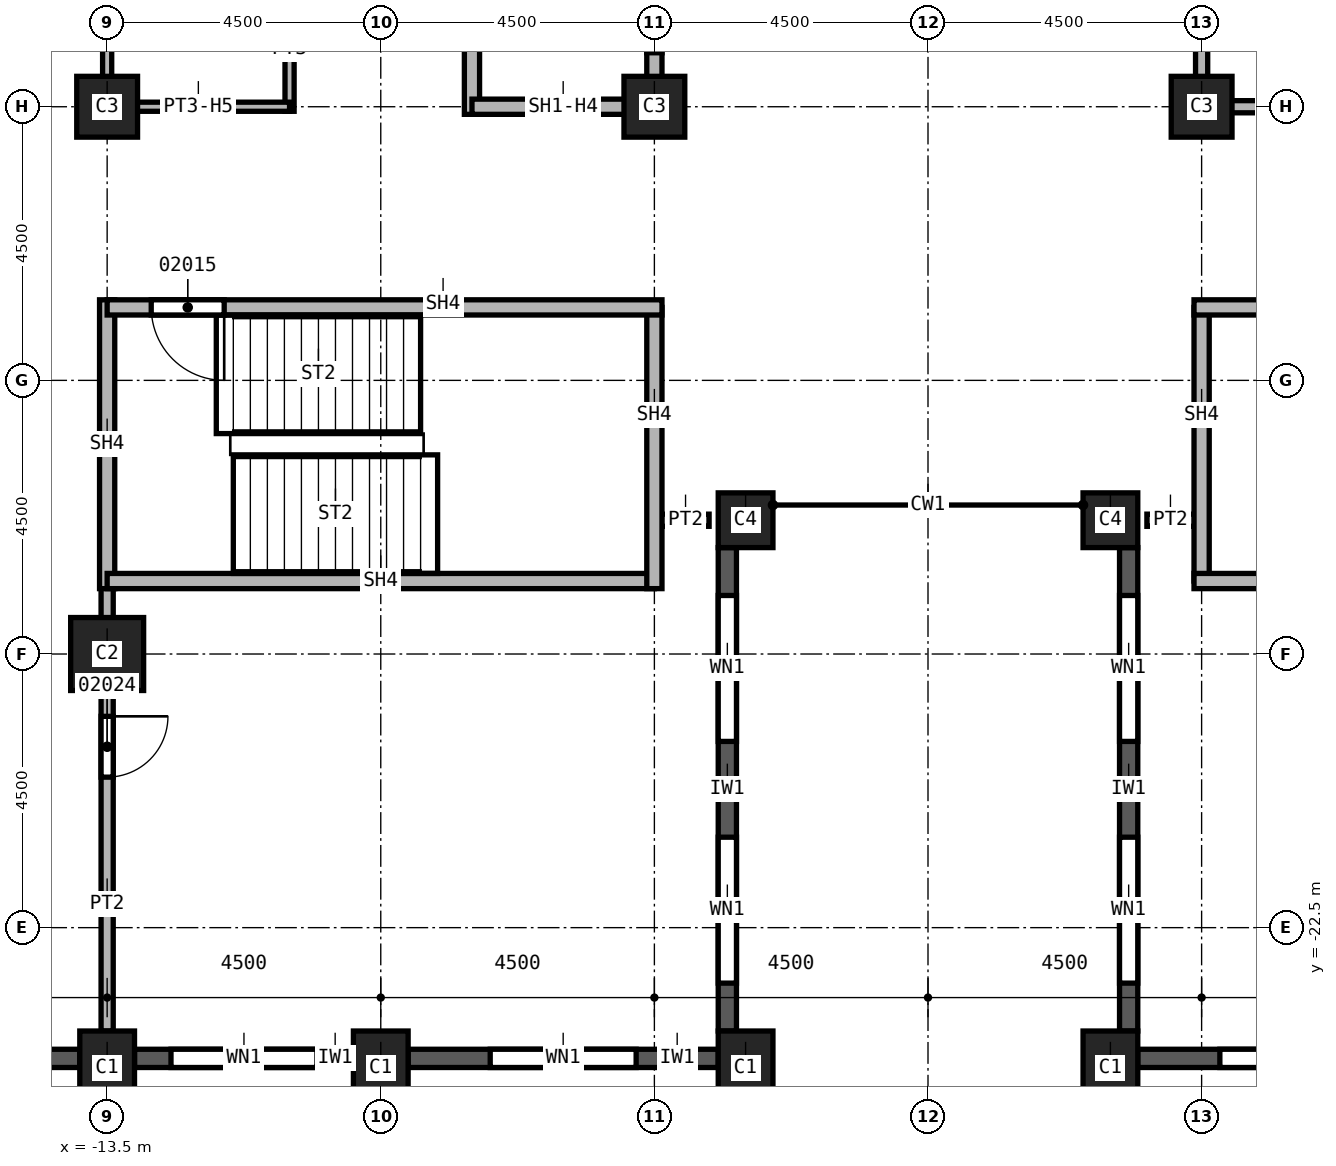
"""IFC4 building model, lengths in metres.
Left out: names, types, materials, properties, quantities, classifications, styles, units other than length and angle.
Written with IfcOpenShell. Run it as: python <this file> out.ifc"""

import sys

from ifc_helpers import new_model, si_unit, direction, frame, frame_2d, origin, origin_2d, place, context, subcontext, project, spatial, rectangle, extrude, element, fill, save


model = new_model("IFC4")
c1 = context("Model", 3, precision=1e-05, world=origin(), true_north=direction((0.0, 1.0)))
c2 = subcontext(c1, "Body", "Model", "MODEL_VIEW")
j1 = project(units=[si_unit("LENGTHUNIT", "METRE"), si_unit("PLANEANGLEUNIT", "RADIAN")], contexts=[c1])
p1 = place(None, origin())
s1 = spatial("IfcSite", under=j1, at=p1, CompositionType="ELEMENT")
p2 = place(p1, origin())
s2 = spatial("IfcBuilding", under=s1, at=p2, CompositionType="ELEMENT")
p3 = place(p2, frame((0.0, 0.0, 80.0)))
s3 = spatial("IfcBuildingStorey", under=s2, at=p3, CompositionType="ELEMENT", Elevation=80.0)
p4 = place(p3, frame((-13.5, -18.0, 0.0), z_axis=(0.0, 0.0, 1.0), x_axis=(1.0, 0.0, 0.0)))
e1 = element("IfcColumn", 1, at=p4, inside=s3, PredefinedType="COLUMN", context=c2, shape_type="SweptSolid", body=[
    extrude(rectangle(XDim=1.2, YDim=1.2, at=origin_2d()), origin(), (0.0, 0.0, 1.0), 3.7),
])
for number, where, z_axis, x_axis in (
    (2, (4.5, -9.0, 0.0), (0.0, 0.0, 1.0), (1.0, 0.0, 0.0)),
    (3, (-4.5, -9.0, 0.0), (0.0, 0.0, 1.0), (1.0, 0.0, 0.0)),
    (4, (-13.5, -9.0, 0.0), (0.0, 0.0, 1.0), (1.0, 0.0, 0.0)),
):
    element("IfcColumn", number, at=place(p3, frame(where, z_axis=z_axis, x_axis=x_axis)), inside=s3, PredefinedType="COLUMN", context=c2, shape_type="SweptSolid", body=[
        extrude(rectangle(XDim=1.0, YDim=1.0, at=origin_2d()), origin(), (0.0, 0.0, 1.0), 3.7),
    ])
for number, where, z_axis, x_axis in (
    (5, (3.0, -24.8, 0.0), (0.0, 0.0, 1.0), (1.0, 0.0, 0.0)),
    (6, (-3.0, -24.8, 0.0), (0.0, 0.0, 1.0), (1.0, 0.0, 0.0)),
    (7, (-9.0, -24.8, 0.0), (0.0, 0.0, 1.0), (1.0, 0.0, 0.0)),
    (8, (-13.5, -24.8, 0.0), (0.0, 0.0, 1.0), (1.0, 0.0, 0.0)),
):
    element("IfcColumn", number, at=place(p3, frame(where, z_axis=z_axis, x_axis=x_axis)), inside=s3, PredefinedType="COLUMN", context=c2, shape_type="SweptSolid", body=[
        extrude(rectangle(XDim=0.9, YDim=1.2, at=origin_2d()), origin(), (0.0, 0.0, 1.0), 3.7),
    ])
for number, where, z_axis, x_axis in (
    (9, (3.0, -15.8, 0.0), (0.0, 0.0, 1.0), (1.0, 0.0, 0.0)),
    (10, (-3.0, -15.8, 0.0), (0.0, 0.0, 1.0), (1.0, 0.0, 0.0)),
):
    element("IfcColumn", number, at=place(p3, frame(where, z_axis=z_axis, x_axis=x_axis)), inside=s3, PredefinedType="COLUMN", context=c2, shape_type="SweptSolid", body=[
        extrude(rectangle(XDim=0.9, YDim=0.9, at=origin_2d()), origin(), (0.0, 0.0, 1.0), 3.7),
    ])
p5 = place(p3, frame((-17.55, -24.65, 0.0), z_axis=(0.0, 0.0, 1.0), x_axis=(1.0, 0.0, 0.0)))
e11 = element("IfcWall", 11, at=p5, inside=s3, PredefinedType="SOLIDWALL", context=c2, shape_type="SweptSolid", body=[
    extrude(rectangle(XDim=3.6, YDim=0.3, at=frame_2d((1.8, 0.0))), origin(), (0.0, 0.0, 1.0), 3.1),
])
p6 = place(p5, frame((0.775, 0.0, 0.8)))
e12 = element("IfcOpeningElement", 12, at=p6, cuts=e11, PredefinedType="OPENING", context=c2, shape_type="SweptSolid", body=[
    extrude(rectangle(XDim=1.0, YDim=1.95, at=frame_2d((0.5, 0.975))), frame((0.0, 0.15, 0.0), z_axis=(0.0, -1.0, 0.0), x_axis=(1.0, 0.0, 0.0)), (0.0, 0.0, 1.0), 0.3),
])
p7 = place(p5, frame((2.375, 0.0, 0.8)))
e13 = element("IfcOpeningElement", 13, at=p7, cuts=e11, PredefinedType="OPENING", context=c2, shape_type="SweptSolid", body=[
    extrude(rectangle(XDim=0.6, YDim=1.95, at=frame_2d((0.3, 0.975))), frame((0.0, 0.15, 0.0), z_axis=(0.0, -1.0, 0.0), x_axis=(1.0, 0.0, 0.0)), (0.0, 0.0, 1.0), 0.3),
])
p8 = place(p3, frame((-13.05, -24.65, 0.0), z_axis=(0.0, 0.0, 1.0), x_axis=(1.0, 0.0, 0.0)))
e14 = element("IfcWall", 14, at=p8, inside=s3, PredefinedType="SOLIDWALL", context=c2, shape_type="SweptSolid", body=[
    extrude(rectangle(XDim=3.6, YDim=0.3, at=frame_2d((1.8, 0.0))), origin(), (0.0, 0.0, 1.0), 3.1),
])
p9 = place(p8, frame((0.6, 0.0, 0.8)))
e15 = element("IfcOpeningElement", 15, at=p9, cuts=e14, PredefinedType="OPENING", context=c2, shape_type="SweptSolid", body=[
    extrude(rectangle(XDim=2.4, YDim=1.95, at=frame_2d((1.2, 0.975))), frame((0.0, 0.15, 0.0), z_axis=(0.0, -1.0, 0.0), x_axis=(1.0, 0.0, 0.0)), (0.0, 0.0, 1.0), 0.3),
])
p10 = place(p3, frame((-8.55, -24.65, 0.0), z_axis=(0.0, 0.0, 1.0), x_axis=(1.0, 0.0, 0.0)))
e16 = element("IfcWall", 16, at=p10, inside=s3, PredefinedType="SOLIDWALL", context=c2, shape_type="SweptSolid", body=[
    extrude(rectangle(XDim=5.1, YDim=0.3, at=frame_2d((2.55, 0.0))), origin(), (0.0, 0.0, 1.0), 3.1),
])
p11 = place(p10, frame((1.35, 0.0, 0.8)))
e17 = element("IfcOpeningElement", 17, at=p11, cuts=e16, PredefinedType="OPENING", context=c2, shape_type="SweptSolid", body=[
    extrude(rectangle(XDim=2.4, YDim=1.95, at=frame_2d((1.2, 0.975))), frame((0.0, 0.15, 0.0), z_axis=(0.0, -1.0, 0.0), x_axis=(1.0, 0.0, 0.0)), (0.0, 0.0, 1.0), 0.3),
])
p12 = place(p3, frame((-3.3, -24.2, 0.0), z_axis=(0.0, 0.0, 1.0), x_axis=(0.0, 1.0, 0.0)))
e18 = element("IfcWall", 18, at=p12, inside=s3, PredefinedType="SOLIDWALL", context=c2, shape_type="SweptSolid", body=[
    extrude(rectangle(XDim=7.95, YDim=0.3, at=frame_2d((3.975, 0.0))), origin(), (0.0, 0.0, 1.0), 3.1),
])
p13 = place(p12, frame((0.788, 0.0, 0.8)))
e19 = element("IfcOpeningElement", 19, at=p13, cuts=e18, PredefinedType="OPENING", context=c2, shape_type="SweptSolid", body=[
    extrude(rectangle(XDim=2.4, YDim=1.95, at=frame_2d((1.2, 0.975))), frame((0.0, 0.15, 0.0), z_axis=(0.0, -1.0, 0.0), x_axis=(1.0, 0.0, 0.0)), (0.0, 0.0, 1.0), 0.3),
])
p14 = place(p12, frame((4.762, 0.0, 0.8)))
e20 = element("IfcOpeningElement", 20, at=p14, cuts=e18, PredefinedType="OPENING", context=c2, shape_type="SweptSolid", body=[
    extrude(rectangle(XDim=2.4, YDim=1.95, at=frame_2d((1.2, 0.975))), frame((0.0, 0.15, 0.0), z_axis=(0.0, -1.0, 0.0), x_axis=(1.0, 0.0, 0.0)), (0.0, 0.0, 1.0), 0.3),
])
p15 = place(p3, frame((3.3, -16.25, 0.0), z_axis=(0.0, 0.0, 1.0), x_axis=(0.0, -1.0, 0.0)))
e21 = element("IfcWall", 21, at=p15, inside=s3, PredefinedType="SOLIDWALL", context=c2, shape_type="SweptSolid", body=[
    extrude(rectangle(XDim=7.95, YDim=0.3, at=frame_2d((3.975, 0.0))), origin(), (0.0, 0.0, 1.0), 3.1),
])
p16 = place(p15, frame((0.788, 0.0, 0.8)))
e22 = element("IfcOpeningElement", 22, at=p16, cuts=e21, PredefinedType="OPENING", context=c2, shape_type="SweptSolid", body=[
    extrude(rectangle(XDim=2.4, YDim=1.95, at=frame_2d((1.2, 0.975))), frame((0.0, 0.15, 0.0), z_axis=(0.0, -1.0, 0.0), x_axis=(1.0, 0.0, 0.0)), (0.0, 0.0, 1.0), 0.3),
])
p17 = place(p15, frame((4.762, 0.0, 0.8)))
e23 = element("IfcOpeningElement", 23, at=p17, cuts=e21, PredefinedType="OPENING", context=c2, shape_type="SweptSolid", body=[
    extrude(rectangle(XDim=2.4, YDim=1.95, at=frame_2d((1.2, 0.975))), frame((0.0, 0.15, 0.0), z_axis=(0.0, -1.0, 0.0), x_axis=(1.0, 0.0, 0.0)), (0.0, 0.0, 1.0), 0.3),
])
p18 = place(p3, frame((3.45, -24.65, 0.0), z_axis=(0.0, 0.0, 1.0), x_axis=(1.0, 0.0, 0.0)))
e24 = element("IfcWall", 24, at=p18, inside=s3, PredefinedType="SOLIDWALL", context=c2, shape_type="SweptSolid", body=[
    extrude(rectangle(XDim=5.1, YDim=0.3, at=frame_2d((2.55, 0.0))), origin(), (0.0, 0.0, 1.0), 3.1),
])
p19 = place(p18, frame((1.35, 0.0, 0.8)))
e25 = element("IfcOpeningElement", 25, at=p19, cuts=e24, PredefinedType="OPENING", context=c2, shape_type="SweptSolid", body=[
    extrude(rectangle(XDim=2.4, YDim=1.95, at=frame_2d((1.2, 0.975))), frame((0.0, 0.15, 0.0), z_axis=(0.0, -1.0, 0.0), x_axis=(1.0, 0.0, 0.0)), (0.0, 0.0, 1.0), 0.3),
])
p20 = place(p3, frame((-13.5, -16.675, 0.0), z_axis=(0.0, 0.0, 1.0), x_axis=(0.0, -1.0, 0.0)))
e26 = element("IfcWall", 26, at=p20, inside=s3, PredefinedType="PARTITIONING", context=c2, shape_type="SweptSolid", body=[
    extrude(rectangle(XDim=7.525, YDim=0.2, at=frame_2d((3.762, 0.0))), origin(), (0.0, 0.0, 1.0), 3.7),
])
p21 = place(p20, frame((2.35, 0.0, 0.0)))
e27 = element("IfcOpeningElement", 27, at=p21, cuts=e26, PredefinedType="OPENING", context=c2, shape_type="SweptSolid", body=[
    extrude(rectangle(XDim=1.0, YDim=2.1, at=frame_2d((0.5, 1.05))), frame((0.0, 0.1, 0.0), z_axis=(0.0, -1.0, 0.0), x_axis=(1.0, 0.0, 0.0)), (0.0, 0.0, 1.0), 0.2),
])
for number, where, z_axis, x_axis in (
    (28, (-3.6, -15.8, 0.0), (0.0, 0.0, 1.0), (-1.0, 0.0, 0.0)),
    (29, (4.5, -15.8, 0.0), (0.0, 0.0, 1.0), (-1.0, 0.0, 0.0)),
):
    element("IfcWall", number, at=place(p3, frame(where, z_axis=z_axis, x_axis=x_axis)), inside=s3, PredefinedType="PARTITIONING", context=c2, shape_type="SweptSolid", body=[
        extrude(rectangle(XDim=0.9, YDim=0.2, at=frame_2d((0.45, 0.0))), origin(), (0.0, 0.0, 1.0), 3.7),
    ])
p22 = place(p3, frame((4.5, -9.1, 0.0), z_axis=(0.0, 0.0, 1.0), x_axis=(0.0, 1.0, 0.0)))
e30 = element("IfcWall", 30, at=p22, inside=s3, PredefinedType="SOLIDWALL", context=c2, shape_type="SweptSolid", body=[
    extrude(rectangle(XDim=9.1, YDim=0.2, at=frame_2d((4.55, 0.0))), origin(), (0.0, 0.0, 1.0), 2.938),
])
p23 = place(p22, frame((2.2, 0.0, 0.0)))
e31 = element("IfcOpeningElement", 31, at=p23, cuts=e30, PredefinedType="OPENING", context=c2, shape_type="SweptSolid", body=[
    extrude(rectangle(XDim=1.1, YDim=2.1, at=frame_2d((0.55, 1.05))), frame((0.0, 0.1, 0.0), z_axis=(0.0, -1.0, 0.0), x_axis=(1.0, 0.0, 0.0)), (0.0, 0.0, 1.0), 0.2),
])
p24 = place(p3, frame((7.5, -9.0, 0.0), z_axis=(0.0, 0.0, 1.0), x_axis=(-1.0, 0.0, 0.0)))
e32 = element("IfcWall", 32, at=p24, inside=s3, PredefinedType="SOLIDWALL", context=c2, shape_type="SweptSolid", body=[
    extrude(rectangle(XDim=3.0, YDim=0.2, at=frame_2d((1.5, 0.0))), origin(), (0.0, 0.0, 1.0), 2.938),
])
p25 = place(p3, frame((-7.5, -9.125, 0.0), z_axis=(0.0, 0.0, 1.0), x_axis=(0.0, 1.0, 0.0)))
e33 = element("IfcWall", 33, at=p25, inside=s3, PredefinedType="SOLIDWALL", context=c2, shape_type="SweptSolid", body=[
    extrude(rectangle(XDim=12.25, YDim=0.25, at=frame_2d((6.125, 0.0))), origin(), (0.0, 0.0, 1.0), 3.7),
])
p26 = place(p3, frame((-4.5, -9.0, 0.0), z_axis=(0.0, 0.0, 1.0), x_axis=(-1.0, 0.0, 0.0)))
e34 = element("IfcWall", 34, at=p26, inside=s3, PredefinedType="SOLIDWALL", context=c2, shape_type="SweptSolid", body=[
    extrude(rectangle(XDim=3.0, YDim=0.25, at=frame_2d((1.5, 0.0))), origin(), (0.0, 0.0, 1.0), 2.938),
])
p27 = place(p3, frame((-4.5, 0.0, 0.0), z_axis=(0.0, 0.0, 1.0), x_axis=(0.0, -1.0, 0.0)))
e35 = element("IfcWall", 35, at=p27, inside=s3, PredefinedType="SOLIDWALL", context=c2, shape_type="SweptSolid", body=[
    extrude(rectangle(XDim=9.125, YDim=0.25, at=frame_2d((4.562, 0.0))), origin(), (0.0, 0.0, 1.0), 2.938),
])
p28 = place(p27, frame((7.012, 0.0, 0.0)))
e36 = element("IfcOpeningElement", 36, at=p28, cuts=e35, PredefinedType="OPENING", context=c2, shape_type="SweptSolid", body=[
    extrude(rectangle(XDim=1.1, YDim=2.1, at=frame_2d((0.55, 1.05))), frame((0.0, 0.125, 0.0), z_axis=(0.0, -1.0, 0.0), x_axis=(1.0, 0.0, 0.0)), (0.0, 0.0, 1.0), 0.25),
])
p29 = place(p27, frame((3.95, 0.0, 0.0)))
e37 = element("IfcOpeningElement", 37, at=p29, cuts=e35, PredefinedType="OPENING", context=c2, shape_type="SweptSolid", body=[
    extrude(rectangle(XDim=1.1, YDim=2.1, at=frame_2d((0.55, 1.05))), frame((0.0, 0.125, 0.0), z_axis=(0.0, -1.0, 0.0), x_axis=(1.0, 0.0, 0.0)), (0.0, 0.0, 1.0), 0.25),
])
p30 = place(p27, frame((0.95, 0.0, 0.0)))
e38 = element("IfcOpeningElement", 38, at=p30, cuts=e35, PredefinedType="OPENING", context=c2, shape_type="SweptSolid", body=[
    extrude(rectangle(XDim=1.1, YDim=2.1, at=frame_2d((0.55, 1.05))), frame((0.0, 0.125, 0.0), z_axis=(0.0, -1.0, 0.0), x_axis=(1.0, 0.0, 0.0)), (0.0, 0.0, 1.0), 0.25),
])
p31 = place(p3, frame((-13.5, -12.175, 0.0), z_axis=(0.0, 0.0, 1.0), x_axis=(0.0, -1.0, 0.0)))
e39 = element("IfcWall", 39, at=p31, inside=s3, PredefinedType="SOLIDWALL", context=c2, shape_type="SweptSolid", body=[
    extrude(rectangle(XDim=4.75, YDim=0.25, at=frame_2d((2.375, 0.0))), origin(), (0.0, 0.0, 1.0), 3.7),
])
p32 = place(p3, frame((-4.5, -16.8, 0.0), z_axis=(0.0, 0.0, 1.0), x_axis=(-1.0, 0.0, 0.0)))
e40 = element("IfcWall", 40, at=p32, inside=s3, PredefinedType="SOLIDWALL", context=c2, shape_type="SweptSolid", body=[
    extrude(rectangle(XDim=9.0, YDim=0.25, at=frame_2d((4.5, 0.0))), origin(), (0.0, 0.0, 1.0), 3.7),
])
p33 = place(p3, frame((-4.5, -12.3, 0.0), z_axis=(0.0, 0.0, 1.0), x_axis=(0.0, -1.0, 0.0)))
e41 = element("IfcWall", 41, at=p33, inside=s3, PredefinedType="SOLIDWALL", context=c2, shape_type="SweptSolid", body=[
    extrude(rectangle(XDim=4.625, YDim=0.25, at=frame_2d((2.312, 0.0))), origin(), (0.0, 0.0, 1.0), 3.7),
])
p34 = place(p3, frame((-4.375, -12.3, 0.0), z_axis=(0.0, 0.0, 1.0), x_axis=(-1.0, 0.0, 0.0)))
e42 = element("IfcWall", 42, at=p34, inside=s3, PredefinedType="SOLIDWALL", context=c2, shape_type="SweptSolid", body=[
    extrude(rectangle(XDim=9.125, YDim=0.25, at=frame_2d((4.562, 0.0))), origin(), (0.0, 0.0, 1.0), 3.7),
])
p35 = place(p34, frame((7.2, 0.0, 0.0)))
e43 = element("IfcOpeningElement", 43, at=p35, cuts=e42, PredefinedType="OPENING", context=c2, shape_type="SweptSolid", body=[
    extrude(rectangle(XDim=1.2, YDim=2.1, at=frame_2d((0.6, 1.05))), frame((0.0, 0.125, 0.0), z_axis=(0.0, -1.0, 0.0), x_axis=(1.0, 0.0, 0.0)), (0.0, 0.0, 1.0), 0.25),
])
p36 = place(p3, frame((4.5, -16.8, 0.0), z_axis=(0.0, 0.0, 1.0), x_axis=(0.0, 1.0, 0.0)))
e44 = element("IfcWall", 44, at=p36, inside=s3, PredefinedType="SOLIDWALL", context=c2, shape_type="SweptSolid", body=[
    extrude(rectangle(XDim=4.5, YDim=0.25, at=frame_2d((2.25, 0.0))), origin(), (0.0, 0.0, 1.0), 3.7),
])
p37 = place(p3, frame((13.5, -16.8, 0.0), z_axis=(0.0, 0.0, 1.0), x_axis=(-1.0, 0.0, 0.0)))
e45 = element("IfcWall", 45, at=p37, inside=s3, PredefinedType="SOLIDWALL", context=c2, shape_type="SweptSolid", body=[
    extrude(rectangle(XDim=9.125, YDim=0.25, at=frame_2d((4.562, 0.0))), origin(), (0.0, 0.0, 1.0), 3.7),
])
p38 = place(p3, frame((13.5, -12.3, 0.0), z_axis=(0.0, 0.0, 1.0), x_axis=(-1.0, 0.0, 0.0)))
e46 = element("IfcWall", 46, at=p38, inside=s3, PredefinedType="SOLIDWALL", context=c2, shape_type="SweptSolid", body=[
    extrude(rectangle(XDim=9.125, YDim=0.25, at=frame_2d((4.562, 0.0))), origin(), (0.0, 0.0, 1.0), 3.7),
])
p39 = place(p38, frame((0.6, 0.0, 0.0)))
e47 = element("IfcOpeningElement", 47, at=p39, cuts=e46, PredefinedType="OPENING", context=c2, shape_type="SweptSolid", body=[
    extrude(rectangle(XDim=1.2, YDim=2.1, at=frame_2d((0.6, 1.05))), frame((0.0, 0.125, 0.0), z_axis=(0.0, -1.0, 0.0), x_axis=(1.0, 0.0, 0.0)), (0.0, 0.0, 1.0), 0.25),
])
p40 = place(p3, frame((-13.5, -9.075, 0.0), z_axis=(0.0, 0.0, 1.0), x_axis=(0.0, 1.0, 0.0)))
e48 = element("IfcWall", 48, at=p40, inside=s3, PredefinedType="PARTITIONING", context=c2, shape_type="SweptSolid", body=[
    extrude(rectangle(XDim=3.075, YDim=0.15, at=frame_2d((1.538, 0.0))), origin(), (0.0, 0.0, 1.0), 2.938),
])
p41 = place(p3, frame((-10.5, -9.075, 0.0), z_axis=(0.0, 0.0, 1.0), x_axis=(0.0, 1.0, 0.0)))
e49 = element("IfcWall", 49, at=p41, inside=s3, PredefinedType="PARTITIONING", context=c2, shape_type="SweptSolid", body=[
    extrude(rectangle(XDim=3.15, YDim=0.15, at=frame_2d((1.575, 0.0))), origin(), (0.0, 0.0, 1.0), 3.7),
])
p42 = place(p41, frame((1.9, 0.0, 0.0)))
e50 = element("IfcOpeningElement", 50, at=p42, cuts=e49, PredefinedType="OPENING", context=c2, shape_type="SweptSolid", body=[
    extrude(rectangle(XDim=0.9, YDim=2.1, at=frame_2d((0.45, 1.05))), frame((0.0, 0.075, 0.0), z_axis=(0.0, -1.0, 0.0), x_axis=(1.0, 0.0, 0.0)), (0.0, 0.0, 1.0), 0.15),
])
p43 = place(p3, frame((-10.5, -9.0, 0.0), z_axis=(0.0, 0.0, 1.0), x_axis=(-1.0, 0.0, 0.0)))
e51 = element("IfcWall", 51, at=p43, inside=s3, PredefinedType="PARTITIONING", context=c2, shape_type="SweptSolid", body=[
    extrude(rectangle(XDim=3.0, YDim=0.15, at=frame_2d((1.5, 0.0))), origin(), (0.0, 0.0, 1.0), 2.938),
])
p44 = place(p9, origin())
e52 = element("IfcWindow", 52, at=p44, inside=s3, PartitioningType="SINGLE_PANEL", PredefinedType="WINDOW", context=c2, shape_type="SweptSolid", body=[
    extrude(rectangle(XDim=2.4, YDim=1.95, at=frame_2d((1.2, 0.975))), frame((0.0, 0.03, 0.0), z_axis=(0.0, -1.0, 0.0), x_axis=(1.0, 0.0, 0.0)), (0.0, 0.0, 1.0), 0.06),
])
fill(e15, e52)
p45 = place(p11, origin())
e53 = element("IfcWindow", 53, at=p45, inside=s3, PartitioningType="SINGLE_PANEL", PredefinedType="WINDOW", context=c2, shape_type="SweptSolid", body=[
    extrude(rectangle(XDim=2.4, YDim=1.95, at=frame_2d((1.2, 0.975))), frame((0.0, 0.03, 0.0), z_axis=(0.0, -1.0, 0.0), x_axis=(1.0, 0.0, 0.0)), (0.0, 0.0, 1.0), 0.06),
])
fill(e17, e53)
p46 = place(p13, origin())
e54 = element("IfcWindow", 54, at=p46, inside=s3, PartitioningType="SINGLE_PANEL", PredefinedType="WINDOW", context=c2, shape_type="SweptSolid", body=[
    extrude(rectangle(XDim=2.4, YDim=1.95, at=frame_2d((1.2, 0.975))), frame((0.0, 0.03, 0.0), z_axis=(0.0, -1.0, 0.0), x_axis=(1.0, 0.0, 0.0)), (0.0, 0.0, 1.0), 0.06),
])
fill(e19, e54)
p47 = place(p14, origin())
e55 = element("IfcWindow", 55, at=p47, inside=s3, PartitioningType="SINGLE_PANEL", PredefinedType="WINDOW", context=c2, shape_type="SweptSolid", body=[
    extrude(rectangle(XDim=2.4, YDim=1.95, at=frame_2d((1.2, 0.975))), frame((0.0, 0.03, 0.0), z_axis=(0.0, -1.0, 0.0), x_axis=(1.0, 0.0, 0.0)), (0.0, 0.0, 1.0), 0.06),
])
fill(e20, e55)
p48 = place(p16, origin())
e56 = element("IfcWindow", 56, at=p48, inside=s3, PartitioningType="SINGLE_PANEL", PredefinedType="WINDOW", context=c2, shape_type="SweptSolid", body=[
    extrude(rectangle(XDim=2.4, YDim=1.95, at=frame_2d((1.2, 0.975))), frame((0.0, 0.03, 0.0), z_axis=(0.0, -1.0, 0.0), x_axis=(1.0, 0.0, 0.0)), (0.0, 0.0, 1.0), 0.06),
])
fill(e22, e56)
p49 = place(p17, origin())
e57 = element("IfcWindow", 57, at=p49, inside=s3, PartitioningType="SINGLE_PANEL", PredefinedType="WINDOW", context=c2, shape_type="SweptSolid", body=[
    extrude(rectangle(XDim=2.4, YDim=1.95, at=frame_2d((1.2, 0.975))), frame((0.0, 0.03, 0.0), z_axis=(0.0, -1.0, 0.0), x_axis=(1.0, 0.0, 0.0)), (0.0, 0.0, 1.0), 0.06),
])
fill(e23, e57)
p50 = place(p19, origin())
e58 = element("IfcWindow", 58, at=p50, inside=s3, PartitioningType="SINGLE_PANEL", PredefinedType="WINDOW", context=c2, shape_type="SweptSolid", body=[
    extrude(rectangle(XDim=2.4, YDim=1.95, at=frame_2d((1.2, 0.975))), frame((0.0, 0.03, 0.0), z_axis=(0.0, -1.0, 0.0), x_axis=(1.0, 0.0, 0.0)), (0.0, 0.0, 1.0), 0.06),
])
fill(e25, e58)
p51 = place(p35, origin())
e59 = element("IfcDoor", 59, at=p51, inside=s3, OperationType="SINGLE_SWING_RIGHT", PredefinedType="DOOR", context=c2, shape_type="SweptSolid", body=[
    extrude(rectangle(XDim=1.2, YDim=2.1, at=frame_2d((0.6, 1.05))), frame((0.0, 0.025, 0.0), z_axis=(0.0, -1.0, 0.0), x_axis=(1.0, 0.0, 0.0)), (0.0, 0.0, 1.0), 0.05),
])
fill(e43, e59)
p52 = place(p21, origin())
e60 = element("IfcDoor", 60, at=p52, inside=s3, OperationType="SINGLE_SWING_LEFT", PredefinedType="DOOR", context=c2, shape_type="SweptSolid", body=[
    extrude(rectangle(XDim=1.0, YDim=2.1, at=frame_2d((0.5, 1.05))), frame((0.0, 0.025, 0.0), z_axis=(0.0, -1.0, 0.0), x_axis=(1.0, 0.0, 0.0)), (0.0, 0.0, 1.0), 0.05),
])
fill(e27, e60)
p53 = place(p28, origin())
e61 = element("IfcDoor", 61, at=p53, inside=s3, OperationType="SLIDING_TO_LEFT", PredefinedType="DOOR", context=c2, shape_type="SweptSolid", body=[
    extrude(rectangle(XDim=1.1, YDim=2.1, at=frame_2d((0.55, 1.05))), frame((0.0, 0.025, 0.0), z_axis=(0.0, -1.0, 0.0), x_axis=(1.0, 0.0, 0.0)), (0.0, 0.0, 1.0), 0.05),
])
fill(e36, e61)
save(model, sys.argv[1])
